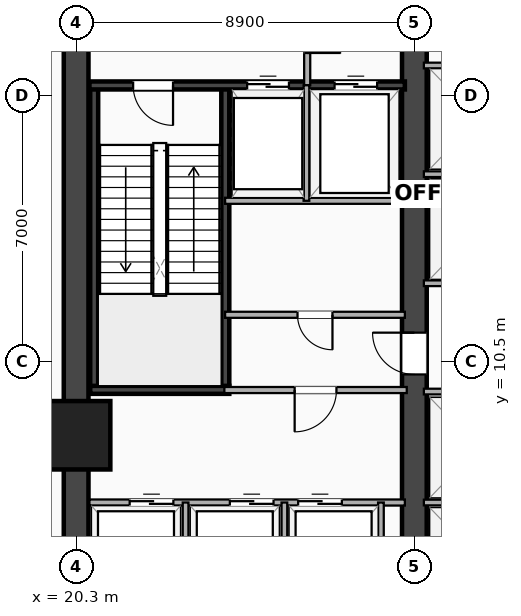
"""IFC4 building model, lengths in metres.
Left out: names, types, materials, properties, quantities, classifications, styles, units other than length and angle.
Written with IfcOpenShell. Run it as: python <this file> out.ifc"""

import sys

from ifc_helpers import new_model, si_unit, direction, frame, frame_2d, origin, origin_2d, place, context, subcontext, project, spatial, rectangle, extrude, element, fill, save


model = new_model("IFC4")
c1 = context("Model", 3, precision=1e-05, world=origin(), true_north=direction((0.0, 1.0)))
c2 = subcontext(c1, "Body", "Model", "MODEL_VIEW")
j1 = project(units=[si_unit("LENGTHUNIT", "METRE"), si_unit("PLANEANGLEUNIT", "RADIAN")], contexts=[c1])
p1 = place(None, origin())
s1 = spatial("IfcSite", under=j1, at=p1, CompositionType="ELEMENT")
p2 = place(p1, origin())
s2 = spatial("IfcBuilding", under=s1, at=p2, CompositionType="ELEMENT")
p3 = place(p2, origin())
s3 = spatial("IfcBuildingStorey", under=s2, at=p3, CompositionType="ELEMENT", Elevation=0.0)
p4 = place(p3, frame((20.3, 3.5, 0.0), z_axis=(0.0, 0.0, 1.0), x_axis=(0.0, 1.0, 0.0)))
e1 = element("IfcWall", 1, at=p4, inside=s3, PredefinedType="SHEAR", context=c2, shape_type="SweptSolid", body=[
    extrude(rectangle(XDim=16.9, YDim=0.65, at=frame_2d((8.45, 0.0))), origin(), (0.0, 0.0, 1.0), 5.1),
])
p5 = place(p3, frame((29.2, 3.5, 0.0), z_axis=(0.0, 0.0, 1.0), x_axis=(0.0, 1.0, 0.0)))
e2 = element("IfcWall", 2, at=p5, inside=s3, PredefinedType="SHEAR", context=c2, shape_type="SweptSolid", body=[
    extrude(rectangle(XDim=16.9, YDim=0.65, at=frame_2d((8.45, 0.0))), origin(), (0.0, 0.0, 1.0), 5.1),
])
p6 = place(p5, frame((7.75, 0.0, 0.0), z_axis=(0.0, 0.0, 1.0), x_axis=(-1.0, 0.0, 0.0)))
e3 = element("IfcOpeningElement", 3, at=p6, cuts=e2, PredefinedType="OPENING", context=c2, shape_type="SweptSolid", body=[
    extrude(rectangle(XDim=1.1, YDim=2.15, at=frame_2d((0.55, 1.075))), frame((0.0, 0.335, 0.0), z_axis=(0.0, -1.0, 0.0), x_axis=(1.0, 0.0, 0.0)), (0.0, 0.0, 1.0), 0.67),
])
for number, where, z_axis, x_axis in (
    (4, (20.775, 9.745, 0.0), (0.0, 0.0, 1.0), (0.0, 1.0, 0.0)),
    (5, (24.225, 9.745, 0.0), (0.0, 0.0, 1.0), (0.0, 1.0, 0.0)),
):
    element("IfcWall", number, at=place(p3, frame(where, z_axis=z_axis, x_axis=x_axis)), inside=s3, PredefinedType="SHEAR", context=c2, shape_type="SweptSolid", body=[
        extrude(rectangle(XDim=8.01, YDim=0.21, at=frame_2d((4.005, 0.0))), origin(), (0.0, 0.0, 1.0), 5.1),
    ])
p7 = place(p3, frame((20.67, 9.745, 0.0), z_axis=(0.0, 0.0, 1.0), x_axis=(1.0, 0.0, 0.0)))
e6 = element("IfcWall", 6, at=p7, inside=s3, PredefinedType="SHEAR", context=c2, shape_type="SweptSolid", body=[
    extrude(rectangle(XDim=3.66, YDim=0.21, at=frame_2d((1.83, 0.0))), origin(), (0.0, 0.0, 1.0), 5.1),
])
p8 = place(p3, frame((20.65, 17.755, 0.0), z_axis=(0.0, 0.0, 1.0), x_axis=(1.0, 0.0, 0.0)))
e7 = element("IfcWall", 7, at=p8, inside=s3, PredefinedType="SHEAR", context=c2, shape_type="SweptSolid", body=[
    extrude(rectangle(XDim=8.3, YDim=0.21, at=frame_2d((4.15, 0.0))), origin(), (0.0, 0.0, 1.0), 5.1),
])
p9 = place(p8, frame((1.15, 0.0, 0.0)))
e8 = element("IfcOpeningElement", 8, at=p9, cuts=e7, PredefinedType="OPENING", context=c2, shape_type="SweptSolid", body=[
    extrude(rectangle(XDim=1.05, YDim=2.15, at=frame_2d((0.525, 1.075))), frame((0.0, 0.115, 0.0), z_axis=(0.0, -1.0, 0.0), x_axis=(1.0, 0.0, 0.0)), (0.0, 0.0, 1.0), 0.23),
])
p10 = place(p8, frame((4.15, 0.0, 0.0)))
e9 = element("IfcOpeningElement", 9, at=p10, cuts=e7, PredefinedType="OPENING", context=c2, shape_type="SweptSolid", body=[
    extrude(rectangle(XDim=1.1, YDim=2.18, at=frame_2d((0.55, 1.09))), frame((0.0, 0.115, 0.0), z_axis=(0.0, -1.0, 0.0), x_axis=(1.0, 0.0, 0.0)), (0.0, 0.0, 1.0), 0.23),
])
p11 = place(p8, frame((6.45, 0.0, 0.0)))
e10 = element("IfcOpeningElement", 10, at=p11, cuts=e7, PredefinedType="OPENING", context=c2, shape_type="SweptSolid", body=[
    extrude(rectangle(XDim=1.12, YDim=2.2, at=frame_2d((0.56, 1.1))), frame((0.0, 0.115, 0.0), z_axis=(0.0, -1.0, 0.0), x_axis=(1.0, 0.0, 0.0)), (0.0, 0.0, 1.0), 0.23),
])
p12 = place(p3, frame((20.3, 8.55, -0.35), z_axis=(0.0, 0.0, 1.0), x_axis=(1.0, 0.0, 0.0)))
e11 = element("IfcColumn", 11, at=p12, inside=s3, PredefinedType="COLUMN", context=c2, shape_type="SweptSolid", body=[
    extrude(rectangle(XDim=1.8, YDim=1.8, at=origin_2d()), origin(), (0.0, 0.0, 1.0), 5.45),
])
p13 = place(p3, frame((26.38, 17.76, 0.0), z_axis=(0.0, 0.0, 1.0), x_axis=(0.0, 1.0, 0.0)))
e12 = element("IfcWall", 12, at=p13, inside=s3, PredefinedType="PARTITIONING", context=c2, shape_type="SweptSolid", body=[
    extrude(rectangle(XDim=2.66, YDim=0.16, at=frame_2d((1.33, 0.0))), origin(), (0.0, 0.0, 1.0), 2.735),
])
p14 = place(p13, frame((0.85, 0.0, 0.0)))
e13 = element("IfcOpeningElement", 13, at=p14, cuts=e12, PredefinedType="OPENING", context=c2, shape_type="SweptSolid", body=[
    extrude(rectangle(XDim=0.88, YDim=2.08, at=frame_2d((0.44, 1.04))), frame((0.0, 0.09, 0.0), z_axis=(0.0, -1.0, 0.0), x_axis=(1.0, 0.0, 0.0)), (0.0, 0.0, 1.0), 0.18),
])
p15 = place(p3, frame((24.22, 14.72, 0.0), z_axis=(0.0, 0.0, 1.0), x_axis=(1.0, 0.0, 0.0)))
e14 = element("IfcWall", 14, at=p15, inside=s3, PredefinedType="PARTITIONING", context=c2, shape_type="SweptSolid", body=[
    extrude(rectangle(XDim=4.73, YDim=0.16, at=frame_2d((2.365, 0.0))), origin(), (0.0, 0.0, 1.0), 4.23),
])
p16 = place(p3, frame((26.36, 14.72, 0.0), z_axis=(0.0, 0.0, 1.0), x_axis=(0.0, 1.0, 0.0)))
e15 = element("IfcWall", 15, at=p16, inside=s3, PredefinedType="PARTITIONING", context=c2, shape_type="SweptSolid", body=[
    extrude(rectangle(XDim=3.04, YDim=0.15, at=frame_2d((1.52, 0.0))), origin(), (0.0, 0.0, 1.0), 5.1),
])
p17 = place(p3, frame((24.22, 11.72, 0.0), z_axis=(0.0, 0.0, 1.0), x_axis=(1.0, 0.0, 0.0)))
e16 = element("IfcWall", 16, at=p17, inside=s3, PredefinedType="PARTITIONING", context=c2, shape_type="SweptSolid", body=[
    extrude(rectangle(XDim=4.73, YDim=0.16, at=frame_2d((2.365, 0.0))), origin(), (0.0, 0.0, 1.0), 4.23),
])
p18 = place(p17, frame((1.905, 0.0, 0.0)))
e17 = element("IfcOpeningElement", 17, at=p18, cuts=e16, PredefinedType="OPENING", context=c2, shape_type="SweptSolid", body=[
    extrude(rectangle(XDim=0.92, YDim=2.08, at=frame_2d((0.46, 1.04))), frame((0.0, 0.09, 0.0), z_axis=(0.0, -1.0, 0.0), x_axis=(1.0, 0.0, 0.0)), (0.0, 0.0, 1.0), 0.18),
])
p19 = place(p3, frame((20.65, 6.78, 0.0), z_axis=(0.0, 0.0, 1.0), x_axis=(1.0, 0.0, 0.0)))
e18 = element("IfcWall", 18, at=p19, inside=s3, PredefinedType="PARTITIONING", context=c2, shape_type="SweptSolid", body=[
    extrude(rectangle(XDim=8.3, YDim=0.16, at=frame_2d((4.15, 0.0))), origin(), (0.0, 0.0, 1.0), 4.23),
])
p20 = place(p19, frame((3.695, 0.0, 0.0)))
e19 = element("IfcOpeningElement", 19, at=p20, cuts=e18, PredefinedType="OPENING", context=c2, shape_type="SweptSolid", body=[
    extrude(rectangle(XDim=1.15, YDim=2.2, at=frame_2d((0.575, 1.1))), frame((0.0, 0.09, 0.0), z_axis=(0.0, -1.0, 0.0), x_axis=(1.0, 0.0, 0.0)), (0.0, 0.0, 1.0), 0.18),
])
p21 = place(p19, frame((5.492, 0.0, 0.0)))
e20 = element("IfcOpeningElement", 20, at=p21, cuts=e18, PredefinedType="OPENING", context=c2, shape_type="SweptSolid", body=[
    extrude(rectangle(XDim=1.15, YDim=2.2, at=frame_2d((0.575, 1.1))), frame((0.0, 0.09, 0.0), z_axis=(0.0, -1.0, 0.0), x_axis=(1.0, 0.0, 0.0)), (0.0, 0.0, 1.0), 0.18),
])
p22 = place(p19, frame((1.059, 0.0, 0.0)))
e21 = element("IfcOpeningElement", 21, at=p22, cuts=e18, PredefinedType="OPENING", context=c2, shape_type="SweptSolid", body=[
    extrude(rectangle(XDim=1.15, YDim=2.2, at=frame_2d((0.575, 1.1))), frame((0.0, 0.09, 0.0), z_axis=(0.0, -1.0, 0.0), x_axis=(1.0, 0.0, 0.0)), (0.0, 0.0, 1.0), 0.18),
])
for number, where, z_axis, x_axis in (
    (22, (23.18, 3.9, 0.0), (0.0, 0.0, 1.0), (0.0, 1.0, 0.0)),
    (23, (25.78, 3.9, 0.0), (0.0, 0.0, 1.0), (0.0, 1.0, 0.0)),
    (24, (28.32, 3.9, 0.0), (0.0, 0.0, 1.0), (0.0, 1.0, 0.0)),
):
    element("IfcWall", number, at=place(p3, frame(where, z_axis=z_axis, x_axis=x_axis)), inside=s3, PredefinedType="PARTITIONING", context=c2, shape_type="SweptSolid", body=[
        extrude(rectangle(XDim=2.88, YDim=0.15, at=frame_2d((1.44, 0.0))), origin(), (0.0, 0.0, 1.0), 4.164),
    ])
p23 = place(p3, frame((24.2, 9.74, 0.0), z_axis=(0.0, 0.0, 1.0), x_axis=(1.0, 0.0, 0.0)))
e25 = element("IfcWall", 25, at=p23, inside=s3, PredefinedType="PARTITIONING", context=c2, shape_type="SweptSolid", body=[
    extrude(rectangle(XDim=4.8, YDim=0.16, at=frame_2d((2.4, 0.0))), origin(), (0.0, 0.0, 1.0), 4.23),
])
p24 = place(p23, frame((1.85, 0.0, 0.0)))
e26 = element("IfcOpeningElement", 26, at=p24, cuts=e25, PredefinedType="OPENING", context=c2, shape_type="SweptSolid", body=[
    extrude(rectangle(XDim=1.1, YDim=2.15, at=frame_2d((0.55, 1.075))), frame((0.0, 0.09, 0.0), z_axis=(0.0, -1.0, 0.0), x_axis=(1.0, 0.0, 0.0)), (0.0, 0.0, 1.0), 0.18),
])
for number, where, z_axis, x_axis in (
    (27, (29.45, 6.78, 0.0), (0.0, 0.0, 1.0), (1.0, 0.0, 0.0)),
    (28, (29.45, 9.7, 0.0), (0.0, 0.0, 1.0), (1.0, 0.0, 0.0)),
    (29, (29.45, 12.55, 0.0), (0.0, 0.0, 1.0), (1.0, 0.0, 0.0)),
    (30, (29.45, 15.42, 0.0), (0.0, 0.0, 1.0), (1.0, 0.0, 0.0)),
    (31, (29.45, 18.28, 0.0), (0.0, 0.0, 1.0), (1.0, 0.0, 0.0)),
):
    element("IfcWall", number, at=place(p3, frame(where, z_axis=z_axis, x_axis=x_axis)), inside=s3, PredefinedType="PARTITIONING", context=c2, shape_type="SweptSolid", body=[
        extrude(rectangle(XDim=2.77, YDim=0.15, at=frame_2d((1.385, 0.0))), origin(), (0.0, 0.0, 1.0), 4.23),
    ])
p25 = place(p9, origin())
e32 = element("IfcDoor", 32, at=p25, inside=s3, OperationType="SINGLE_SWING_RIGHT", PredefinedType="DOOR", context=c2, shape_type="SweptSolid", body=[
    extrude(rectangle(XDim=1.05, YDim=2.15, at=frame_2d((0.525, 1.075))), frame((0.0, 0.025, 0.0), z_axis=(0.0, -1.0, 0.0), x_axis=(1.0, 0.0, 0.0)), (0.0, 0.0, 1.0), 0.05),
])
fill(e8, e32)
p26 = place(p10, origin())
e33 = element("IfcDoor", 33, at=p26, inside=s3, OperationType="DOUBLE_DOOR_SLIDING", PredefinedType="DOOR", context=c2, shape_type="SweptSolid", body=[
    extrude(rectangle(XDim=1.1, YDim=2.18, at=frame_2d((0.55, 1.09))), frame((0.0, 0.025, 0.0), z_axis=(0.0, -1.0, 0.0), x_axis=(1.0, 0.0, 0.0)), (0.0, 0.0, 1.0), 0.05),
])
fill(e9, e33)
p27 = place(p11, origin())
e34 = element("IfcDoor", 34, at=p27, inside=s3, OperationType="DOUBLE_DOOR_SLIDING", PredefinedType="DOOR", context=c2, shape_type="SweptSolid", body=[
    extrude(rectangle(XDim=1.12, YDim=2.2, at=frame_2d((0.56, 1.1))), frame((0.0, 0.025, 0.0), z_axis=(0.0, -1.0, 0.0), x_axis=(1.0, 0.0, 0.0)), (0.0, 0.0, 1.0), 0.05),
])
fill(e10, e34)
p28 = place(p6, origin())
e35 = element("IfcDoor", 35, at=p28, inside=s3, OperationType="SINGLE_SWING_RIGHT", PredefinedType="DOOR", context=c2, shape_type="SweptSolid", body=[
    extrude(rectangle(XDim=1.1, YDim=2.15, at=frame_2d((0.55, 1.075))), frame((0.0, 0.025, 0.0), z_axis=(0.0, -1.0, 0.0), x_axis=(1.0, 0.0, 0.0)), (0.0, 0.0, 1.0), 0.05),
])
fill(e3, e35)
p29 = place(p14, origin())
e36 = element("IfcDoor", 36, at=p29, inside=s3, OperationType="SINGLE_SWING_LEFT", PredefinedType="DOOR", context=c2, shape_type="SweptSolid", body=[
    extrude(rectangle(XDim=0.88, YDim=2.08, at=frame_2d((0.44, 1.04))), frame((0.0, 0.025, 0.0), z_axis=(0.0, -1.0, 0.0), x_axis=(1.0, 0.0, 0.0)), (0.0, 0.0, 1.0), 0.05),
])
fill(e13, e36)
p30 = place(p18, origin())
e37 = element("IfcDoor", 37, at=p30, inside=s3, OperationType="SINGLE_SWING_RIGHT", PredefinedType="DOOR", context=c2, shape_type="SweptSolid", body=[
    extrude(rectangle(XDim=0.92, YDim=2.08, at=frame_2d((0.46, 1.04))), frame((0.0, 0.025, 0.0), z_axis=(0.0, -1.0, 0.0), x_axis=(1.0, 0.0, 0.0)), (0.0, 0.0, 1.0), 0.05),
])
fill(e17, e37)
p31 = place(p20, origin())
e38 = element("IfcDoor", 38, at=p31, inside=s3, OperationType="DOUBLE_DOOR_SLIDING", PredefinedType="DOOR", context=c2, shape_type="SweptSolid", body=[
    extrude(rectangle(XDim=1.15, YDim=2.2, at=frame_2d((0.575, 1.1))), frame((0.0, 0.025, 0.0), z_axis=(0.0, -1.0, 0.0), x_axis=(1.0, 0.0, 0.0)), (0.0, 0.0, 1.0), 0.05),
])
fill(e19, e38)
p32 = place(p21, origin())
e39 = element("IfcDoor", 39, at=p32, inside=s3, OperationType="DOUBLE_DOOR_SLIDING", PredefinedType="DOOR", context=c2, shape_type="SweptSolid", body=[
    extrude(rectangle(XDim=1.15, YDim=2.2, at=frame_2d((0.575, 1.1))), frame((0.0, 0.025, 0.0), z_axis=(0.0, -1.0, 0.0), x_axis=(1.0, 0.0, 0.0)), (0.0, 0.0, 1.0), 0.05),
])
fill(e20, e39)
p33 = place(p22, origin())
e40 = element("IfcDoor", 40, at=p33, inside=s3, OperationType="DOUBLE_DOOR_SLIDING", PredefinedType="DOOR", context=c2, shape_type="SweptSolid", body=[
    extrude(rectangle(XDim=1.15, YDim=2.2, at=frame_2d((0.575, 1.1))), frame((0.0, 0.025, 0.0), z_axis=(0.0, -1.0, 0.0), x_axis=(1.0, 0.0, 0.0)), (0.0, 0.0, 1.0), 0.05),
])
fill(e21, e40)
p34 = place(p24, origin())
e41 = element("IfcDoor", 41, at=p34, inside=s3, OperationType="SINGLE_SWING_LEFT", PredefinedType="DOOR", context=c2, shape_type="SweptSolid", body=[
    extrude(rectangle(XDim=1.1, YDim=2.15, at=frame_2d((0.55, 1.075))), frame((0.0, 0.025, 0.0), z_axis=(0.0, -1.0, 0.0), x_axis=(1.0, 0.0, 0.0)), (0.0, 0.0, 1.0), 0.05),
])
fill(e26, e41)
save(model, sys.argv[1])
